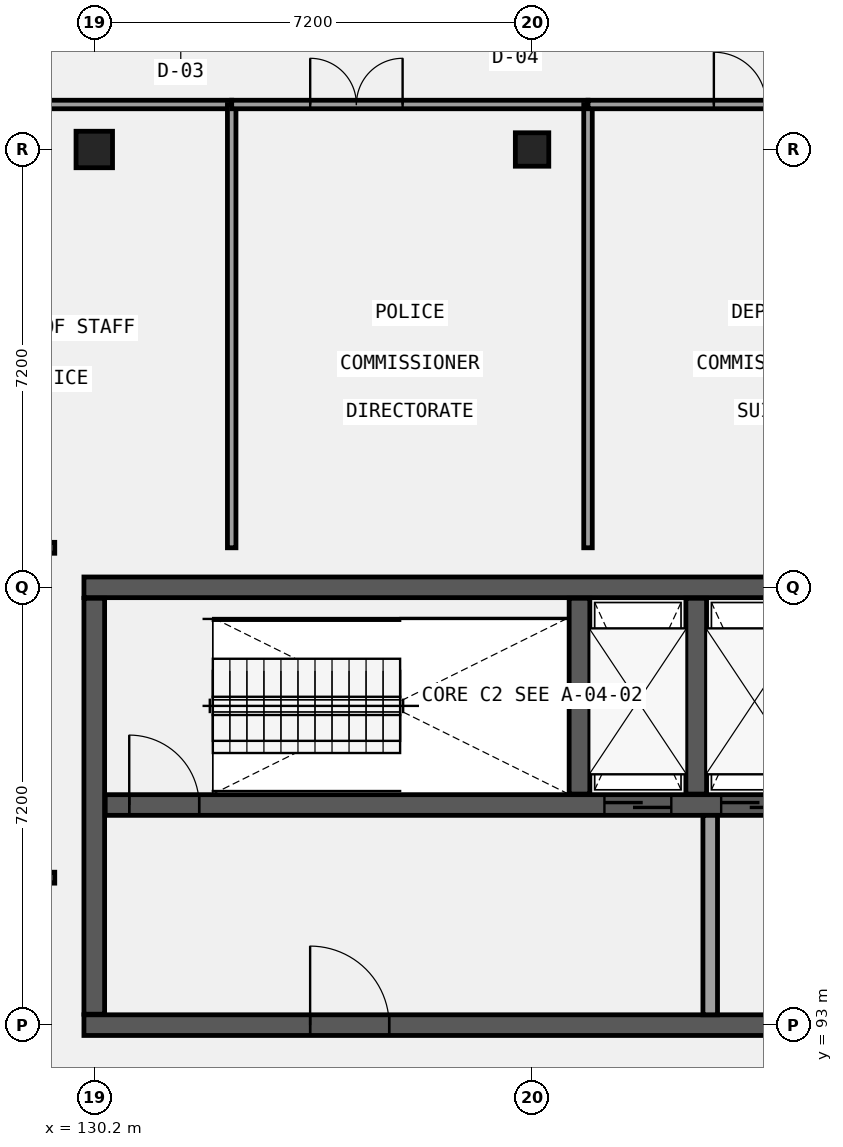
"""IFC4 building model, lengths in metres.
Left out: names, types, materials, properties, quantities, classifications, styles, units other than length and angle.
Written with IfcOpenShell. Run it as: python <this file> out.ifc"""

import sys

from ifc_helpers import new_model, si_unit, direction, frame, frame_2d, origin, origin_2d, place, context, subcontext, project, spatial, rectangle, extrude, element, fill, save


model = new_model("IFC4")
c1 = context("Model", 3, precision=1e-05, world=origin(), true_north=direction((0.0, 1.0)))
c2 = subcontext(c1, "Body", "Model", "MODEL_VIEW")
j1 = project(units=[si_unit("LENGTHUNIT", "METRE"), si_unit("PLANEANGLEUNIT", "RADIAN")], contexts=[c1])
p1 = place(None, origin())
s1 = spatial("IfcSite", under=j1, at=p1, CompositionType="ELEMENT")
p2 = place(p1, origin())
s2 = spatial("IfcBuilding", under=s1, at=p2, CompositionType="ELEMENT")
p3 = place(p2, frame((0.0, 0.0, 22.2)))
s3 = spatial("IfcBuildingStorey", under=s2, at=p3, CompositionType="ELEMENT", Elevation=22.2)
p4 = place(p3, frame((130.03, 100.2, 0.0), z_axis=(0.0, 0.0, 1.0), x_axis=(1.0, 0.0, 0.0)))
e1 = element("IfcWall", 1, at=p4, inside=s3, PredefinedType="SHEAR", context=c2, shape_type="SweptSolid", body=[
    extrude(rectangle(XDim=14.74, YDim=0.34, at=frame_2d((7.37, 0.0))), origin(), (0.0, 0.0, 1.0), 4.2),
])
p5 = place(p3, frame((130.03, 93.0, 0.0), z_axis=(0.0, 0.0, 1.0), x_axis=(1.0, 0.0, 0.0)))
e2 = element("IfcWall", 2, at=p5, inside=s3, PredefinedType="SHEAR", context=c2, shape_type="SweptSolid", body=[
    extrude(rectangle(XDim=14.74, YDim=0.34, at=frame_2d((7.37, 0.0))), origin(), (0.0, 0.0, 1.0), 4.2),
])
p6 = place(p5, frame((3.72, 0.0, 0.0)))
e3 = element("IfcOpeningElement", 3, at=p6, cuts=e2, PredefinedType="OPENING", context=c2, shape_type="SweptSolid", body=[
    extrude(rectangle(XDim=1.3, YDim=2.2, at=frame_2d((0.65, 1.1))), frame((0.0, 0.18, 0.0), z_axis=(0.0, -1.0, 0.0), x_axis=(1.0, 0.0, 0.0)), (0.0, 0.0, 1.0), 0.36),
])
p7 = place(p5, frame((11.72, 0.0, 0.0)))
e4 = element("IfcOpeningElement", 4, at=p7, cuts=e2, PredefinedType="OPENING", context=c2, shape_type="SweptSolid", body=[
    extrude(rectangle(XDim=1.3, YDim=2.2, at=frame_2d((0.65, 1.1))), frame((0.0, 0.18, 0.0), z_axis=(0.0, -1.0, 0.0), x_axis=(1.0, 0.0, 0.0)), (0.0, 0.0, 1.0), 0.36),
])
p8 = place(p3, frame((130.2, 93.18, 0.0), z_axis=(0.0, 0.0, 1.0), x_axis=(0.0, 1.0, 0.0)))
e5 = element("IfcWall", 5, at=p8, inside=s3, PredefinedType="SHEAR", context=c2, shape_type="SweptSolid", body=[
    extrude(rectangle(XDim=6.84, YDim=0.34, at=frame_2d((3.42, 0.0))), origin(), (0.0, 0.0, 1.0), 4.2),
])
p9 = place(p3, frame((130.38, 96.62, 0.0), z_axis=(0.0, 0.0, 1.0), x_axis=(1.0, 0.0, 0.0)))
e6 = element("IfcWall", 6, at=p9, inside=s3, PredefinedType="SHEAR", context=c2, shape_type="SweptSolid", body=[
    extrude(rectangle(XDim=14.04, YDim=0.34, at=frame_2d((7.02, 0.0))), origin(), (0.0, 0.0, 1.0), 4.2),
])
p10 = place(p9, frame((8.21, 0.0, 0.0)))
e7 = element("IfcOpeningElement", 7, at=p10, cuts=e6, PredefinedType="OPENING", context=c2, shape_type="SweptSolid", body=[
    extrude(rectangle(XDim=1.1, YDim=2.15, at=frame_2d((0.55, 1.075))), frame((0.0, 0.18, 0.0), z_axis=(0.0, -1.0, 0.0), x_axis=(1.0, 0.0, 0.0)), (0.0, 0.0, 1.0), 0.36),
])
p11 = place(p9, frame((10.13, 0.0, 0.0)))
e8 = element("IfcOpeningElement", 8, at=p11, cuts=e6, PredefinedType="OPENING", context=c2, shape_type="SweptSolid", body=[
    extrude(rectangle(XDim=1.1, YDim=2.15, at=frame_2d((0.55, 1.075))), frame((0.0, 0.18, 0.0), z_axis=(0.0, -1.0, 0.0), x_axis=(1.0, 0.0, 0.0)), (0.0, 0.0, 1.0), 0.36),
])
p12 = place(p9, frame((12.05, 0.0, 0.0)))
e9 = element("IfcOpeningElement", 9, at=p12, cuts=e6, PredefinedType="OPENING", context=c2, shape_type="SweptSolid", body=[
    extrude(rectangle(XDim=1.1, YDim=2.15, at=frame_2d((0.55, 1.075))), frame((0.0, 0.18, 0.0), z_axis=(0.0, -1.0, 0.0), x_axis=(1.0, 0.0, 0.0)), (0.0, 0.0, 1.0), 0.36),
])
p13 = place(p9, frame((0.395, 0.0, 0.0)))
e10 = element("IfcOpeningElement", 10, at=p13, cuts=e6, PredefinedType="OPENING", context=c2, shape_type="SweptSolid", body=[
    extrude(rectangle(XDim=1.15, YDim=2.15, at=frame_2d((0.575, 1.075))), frame((0.0, 0.18, 0.0), z_axis=(0.0, -1.0, 0.0), x_axis=(1.0, 0.0, 0.0)), (0.0, 0.0, 1.0), 0.36),
])
for number, where, z_axis, x_axis in (
    (11, (138.18, 96.8, 0.0), (0.0, 0.0, 1.0), (0.0, 1.0, 0.0)),
    (12, (140.1, 96.8, 0.0), (0.0, 0.0, 1.0), (0.0, 1.0, 0.0)),
):
    element("IfcWall", number, at=place(p3, frame(where, z_axis=z_axis, x_axis=x_axis)), inside=s3, PredefinedType="SHEAR", context=c2, shape_type="SweptSolid", body=[
        extrude(rectangle(XDim=3.22, YDim=0.34, at=frame_2d((1.61, 0.0))), origin(), (0.0, 0.0, 1.0), 4.2),
    ])
p14 = place(p3, frame((130.2, 107.4, 0.0), z_axis=(0.0, 0.0, 1.0), x_axis=(1.0, 0.0, 0.0)))
e13 = element("IfcColumn", 13, at=p14, inside=s3, PredefinedType="COLUMN", context=c2, shape_type="SweptSolid", body=[
    extrude(rectangle(XDim=0.6, YDim=0.6, at=origin_2d()), origin(), (0.0, 0.0, 1.0), 4.2),
])
p15 = place(p3, frame((137.4, 107.4, 0.0), z_axis=(0.0, 0.0, 1.0), x_axis=(1.0, 0.0, 0.0)))
e14 = element("IfcColumn", 14, at=p15, inside=s3, PredefinedType="COLUMN", context=c2, shape_type="SweptSolid", body=[
    extrude(rectangle(XDim=0.55, YDim=0.55, at=origin_2d()), origin(), (0.0, 0.0, 1.0), 4.2),
])
p16 = place(p3, frame((140.33, 93.17, 0.0), z_axis=(0.0, 0.0, 1.0), x_axis=(0.0, 1.0, 0.0)))
e15 = element("IfcWall", 15, at=p16, inside=s3, PredefinedType="SOLIDWALL", context=c2, shape_type="SweptSolid", body=[
    extrude(rectangle(XDim=3.28, YDim=0.24, at=frame_2d((1.64, 0.0))), origin(), (0.0, 0.0, 1.0), 3.89),
])
p17 = place(p3, frame((126.6, 108.14, 0.0), z_axis=(0.0, 0.0, 1.0), x_axis=(1.0, 0.0, 0.0)))
e16 = element("IfcWall", 16, at=p17, inside=s3, PredefinedType="PARTITIONING", context=c2, shape_type="SweptSolid", body=[
    extrude(rectangle(XDim=5.86, YDim=0.14, at=frame_2d((2.93, 0.0))), origin(), (0.0, 0.0, 1.0), 3.92),
])
p18 = place(p17, frame((1.005, 0.0, 0.0)))
e17 = element("IfcOpeningElement", 17, at=p18, cuts=e16, PredefinedType="OPENING", context=c2, shape_type="SweptSolid", body=[
    extrude(rectangle(XDim=0.92, YDim=2.1, at=frame_2d((0.46, 1.05))), frame((0.0, 0.08, 0.0), z_axis=(0.0, -1.0, 0.0), x_axis=(1.0, 0.0, 0.0)), (0.0, 0.0, 1.0), 0.16),
])
p19 = place(p3, frame((132.46, 100.85, 0.0), z_axis=(0.0, 0.0, 1.0), x_axis=(0.0, 1.0, 0.0)))
e18 = element("IfcWall", 18, at=p19, inside=s3, PredefinedType="PARTITIONING", context=c2, shape_type="SweptSolid", body=[
    extrude(rectangle(XDim=7.29, YDim=0.14, at=frame_2d((3.645, 0.0))), origin(), (0.0, 0.0, 1.0), 3.92),
])
p20 = place(p3, frame((132.46, 108.14, 0.0), z_axis=(0.0, 0.0, 1.0), x_axis=(1.0, 0.0, 0.0)))
e19 = element("IfcWall", 19, at=p20, inside=s3, PredefinedType="PARTITIONING", context=c2, shape_type="SweptSolid", body=[
    extrude(rectangle(XDim=5.86, YDim=0.14, at=frame_2d((2.93, 0.0))), origin(), (0.0, 0.0, 1.0), 3.92),
])
p21 = place(p20, frame((1.291, 0.0, 0.0)))
e20 = element("IfcOpeningElement", 20, at=p21, cuts=e19, PredefinedType="OPENING", context=c2, shape_type="SweptSolid", body=[
    extrude(rectangle(XDim=1.52, YDim=2.35, at=frame_2d((0.76, 1.175))), frame((0.0, 0.08, 0.0), z_axis=(0.0, -1.0, 0.0), x_axis=(1.0, 0.0, 0.0)), (0.0, 0.0, 1.0), 0.16),
])
p22 = place(p3, frame((138.32, 100.85, 0.0), z_axis=(0.0, 0.0, 1.0), x_axis=(0.0, 1.0, 0.0)))
e21 = element("IfcWall", 21, at=p22, inside=s3, PredefinedType="PARTITIONING", context=c2, shape_type="SweptSolid", body=[
    extrude(rectangle(XDim=7.29, YDim=0.14, at=frame_2d((3.645, 0.0))), origin(), (0.0, 0.0, 1.0), 3.92),
])
p23 = place(p3, frame((138.32, 108.14, 0.0), z_axis=(0.0, 0.0, 1.0), x_axis=(1.0, 0.0, 0.0)))
e22 = element("IfcWall", 22, at=p23, inside=s3, PredefinedType="PARTITIONING", context=c2, shape_type="SweptSolid", body=[
    extrude(rectangle(XDim=5.86, YDim=0.14, at=frame_2d((2.93, 0.0))), origin(), (0.0, 0.0, 1.0), 3.92),
])
p24 = place(p23, frame((2.07, 0.0, 0.0)))
e23 = element("IfcOpeningElement", 23, at=p24, cuts=e22, PredefinedType="OPENING", context=c2, shape_type="SweptSolid", body=[
    extrude(rectangle(XDim=1.72, YDim=2.1, at=frame_2d((0.86, 1.05))), frame((0.0, 0.08, 0.0), z_axis=(0.0, -1.0, 0.0), x_axis=(1.0, 0.0, 0.0)), (0.0, 0.0, 1.0), 0.16),
])
for number, where, z_axis, x_axis in (
    (24, (126.27, 100.85, 0.0), (0.0, 0.0, 1.0), (1.0, 0.0, 0.0)),
    (25, (126.27, 95.425, 0.0), (0.0, 0.0, 1.0), (1.0, 0.0, 0.0)),
):
    element("IfcWall", number, at=place(p3, frame(where, z_axis=z_axis, x_axis=x_axis)), inside=s3, PredefinedType="PARTITIONING", context=c2, shape_type="SweptSolid", body=[
        extrude(rectangle(XDim=3.28, YDim=0.18, at=frame_2d((1.64, 0.0))), origin(), (0.0, 0.0, 1.0), 3.92),
    ])
p25 = place(p10, frame((1.1, 0.0, 0.0), z_axis=(0.0, 0.0, 1.0), x_axis=(-1.0, 0.0, 0.0)))
e26 = element("IfcDoor", 26, at=p25, inside=s3, OperationType="DOUBLE_DOOR_SLIDING", PredefinedType="DOOR", context=c2, shape_type="SweptSolid", body=[
    extrude(rectangle(XDim=1.1, YDim=2.15, at=frame_2d((0.55, 1.075))), frame((0.0, 0.025, 0.0), z_axis=(0.0, -1.0, 0.0), x_axis=(1.0, 0.0, 0.0)), (0.0, 0.0, 1.0), 0.05),
])
fill(e7, e26)
p26 = place(p11, frame((1.1, 0.0, 0.0), z_axis=(0.0, 0.0, 1.0), x_axis=(-1.0, 0.0, 0.0)))
e27 = element("IfcDoor", 27, at=p26, inside=s3, OperationType="DOUBLE_DOOR_SLIDING", PredefinedType="DOOR", context=c2, shape_type="SweptSolid", body=[
    extrude(rectangle(XDim=1.1, YDim=2.15, at=frame_2d((0.55, 1.075))), frame((0.0, 0.025, 0.0), z_axis=(0.0, -1.0, 0.0), x_axis=(1.0, 0.0, 0.0)), (0.0, 0.0, 1.0), 0.05),
])
fill(e8, e27)
p27 = place(p13, origin())
e28 = element("IfcDoor", 28, at=p27, inside=s3, OperationType="SINGLE_SWING_LEFT", PredefinedType="DOOR", context=c2, shape_type="SweptSolid", body=[
    extrude(rectangle(XDim=1.15, YDim=2.15, at=frame_2d((0.575, 1.075))), frame((0.0, 0.025, 0.0), z_axis=(0.0, -1.0, 0.0), x_axis=(1.0, 0.0, 0.0)), (0.0, 0.0, 1.0), 0.05),
])
fill(e10, e28)
p28 = place(p6, frame((1.3, 0.0, 0.0), z_axis=(0.0, 0.0, 1.0), x_axis=(-1.0, 0.0, 0.0)))
e29 = element("IfcDoor", 29, at=p28, inside=s3, OperationType="SINGLE_SWING_LEFT", PredefinedType="DOOR", context=c2, shape_type="SweptSolid", body=[
    extrude(rectangle(XDim=1.3, YDim=2.2, at=frame_2d((0.65, 1.1))), frame((0.0, 0.025, 0.0), z_axis=(0.0, -1.0, 0.0), x_axis=(1.0, 0.0, 0.0)), (0.0, 0.0, 1.0), 0.05),
])
fill(e3, e29)
p29 = place(p21, frame((1.52, 0.0, 0.0), z_axis=(0.0, 0.0, 1.0), x_axis=(-1.0, 0.0, 0.0)))
e30 = element("IfcDoor", 30, at=p29, inside=s3, OperationType="DOUBLE_DOOR_SINGLE_SWING", PredefinedType="DOOR", context=c2, shape_type="SweptSolid", body=[
    extrude(rectangle(XDim=1.52, YDim=2.35, at=frame_2d((0.76, 1.175))), frame((0.0, 0.025, 0.0), z_axis=(0.0, -1.0, 0.0), x_axis=(1.0, 0.0, 0.0)), (0.0, 0.0, 1.0), 0.05),
])
fill(e20, e30)
p30 = place(p24, frame((1.72, 0.0, 0.0), z_axis=(0.0, 0.0, 1.0), x_axis=(-1.0, 0.0, 0.0)))
e31 = element("IfcDoor", 31, at=p30, inside=s3, OperationType="DOUBLE_DOOR_SINGLE_SWING", PredefinedType="DOOR", context=c2, shape_type="SweptSolid", body=[
    extrude(rectangle(XDim=1.72, YDim=2.1, at=frame_2d((0.86, 1.05))), frame((0.0, 0.025, 0.0), z_axis=(0.0, -1.0, 0.0), x_axis=(1.0, 0.0, 0.0)), (0.0, 0.0, 1.0), 0.05),
])
fill(e23, e31)
save(model, sys.argv[1])
